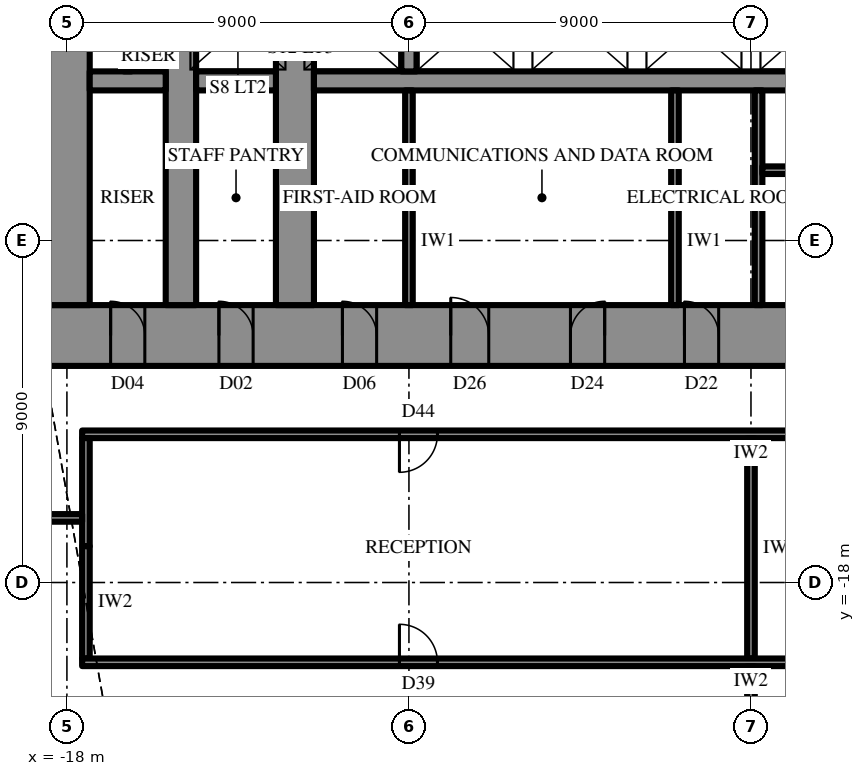
"""IFC4 building model, lengths in metres.
Left out: names, types, materials, properties, quantities, classifications, styles, units other than length and angle.
Written with IfcOpenShell. Run it as: python <this file> out.ifc"""

import sys

from ifc_helpers import new_model, si_unit, direction, frame, frame_2d, origin, place, context, subcontext, project, spatial, rectangle, extrude, element, fill, save


model = new_model("IFC4")
c1 = context("Model", 3, precision=1e-05, world=origin(), true_north=direction((0.0, 1.0)))
c2 = subcontext(c1, "Body", "Model", "MODEL_VIEW")
j1 = project(units=[si_unit("LENGTHUNIT", "METRE"), si_unit("PLANEANGLEUNIT", "RADIAN")], contexts=[c1])
p1 = place(None, origin())
s1 = spatial("IfcSite", under=j1, at=p1, CompositionType="ELEMENT")
p2 = place(p1, origin())
s2 = spatial("IfcBuilding", under=s1, at=p2, CompositionType="ELEMENT")
p3 = place(p2, frame((0.0, 0.0, 210.5)))
s3 = spatial("IfcBuildingStorey", under=s2, at=p3, CompositionType="ELEMENT", Elevation=210.5)
p4 = place(p3, frame((18.6, -11.5, 0.0), z_axis=(0.0, 0.0, 1.0), x_axis=(-1.0, 0.0, 0.0)))
e1 = element("IfcWall", 1, at=p4, inside=s3, PredefinedType="SHEAR", context=c2, shape_type="SweptSolid", body=[
    extrude(rectangle(XDim=37.2, YDim=1.6, at=frame_2d((18.6, 0.0))), origin(), (0.0, 0.0, 1.0), 5.0),
])
p5 = place(p4, frame((19.45, 0.0, 0.0)))
e2 = element("IfcOpeningElement", 2, at=p5, cuts=e1, PredefinedType="OPENING", context=c2, shape_type="SweptSolid", body=[
    extrude(rectangle(XDim=0.9, YDim=2.2, at=frame_2d((0.45, 1.1))), frame((0.0, 0.81, 0.0), z_axis=(0.0, -1.0, 0.0), x_axis=(1.0, 0.0, 0.0)), (0.0, 0.0, 1.0), 1.62),
])
p6 = place(p4, frame((22.45, 0.0, 0.0)))
e3 = element("IfcOpeningElement", 3, at=p6, cuts=e1, PredefinedType="OPENING", context=c2, shape_type="SweptSolid", body=[
    extrude(rectangle(XDim=0.9, YDim=2.2, at=frame_2d((0.45, 1.1))), frame((0.0, 0.81, 0.0), z_axis=(0.0, -1.0, 0.0), x_axis=(1.0, 0.0, 0.0)), (0.0, 0.0, 1.0), 1.62),
])
p7 = place(p4, frame((25.5, 0.0, 0.0)))
e4 = element("IfcOpeningElement", 4, at=p7, cuts=e1, PredefinedType="OPENING", context=c2, shape_type="SweptSolid", body=[
    extrude(rectangle(XDim=1.0, YDim=2.2, at=frame_2d((0.5, 1.1))), frame((0.0, 0.81, 0.0), z_axis=(0.0, -1.0, 0.0), x_axis=(1.0, 0.0, 0.0)), (0.0, 0.0, 1.0), 1.62),
])
p8 = place(p4, frame((1.75, 0.0, 0.0)))
e5 = element("IfcOpeningElement", 5, at=p8, cuts=e1, PredefinedType="OPENING", context=c2, shape_type="SweptSolid", body=[
    extrude(rectangle(XDim=0.9, YDim=2.2, at=frame_2d((0.45, 1.1))), frame((0.0, 0.81, 0.0), z_axis=(0.0, -1.0, 0.0), x_axis=(1.0, 0.0, 0.0)), (0.0, 0.0, 1.0), 1.62),
])
p9 = place(p4, frame((4.6, 0.0, 0.0)))
e6 = element("IfcOpeningElement", 6, at=p9, cuts=e1, PredefinedType="OPENING", context=c2, shape_type="SweptSolid", body=[
    extrude(rectangle(XDim=0.9, YDim=2.2, at=frame_2d((0.45, 1.1))), frame((0.0, 0.81, 0.0), z_axis=(0.0, -1.0, 0.0), x_axis=(1.0, 0.0, 0.0)), (0.0, 0.0, 1.0), 1.62),
])
p10 = place(p4, frame((7.85, 0.0, 0.0)))
e7 = element("IfcOpeningElement", 7, at=p10, cuts=e1, PredefinedType="OPENING", context=c2, shape_type="SweptSolid", body=[
    extrude(rectangle(XDim=0.9, YDim=2.2, at=frame_2d((0.45, 1.1))), frame((0.0, 0.81, 0.0), z_axis=(0.0, -1.0, 0.0), x_axis=(1.0, 0.0, 0.0)), (0.0, 0.0, 1.0), 1.62),
])
p11 = place(p4, frame((28.45, 0.0, 0.0)))
e8 = element("IfcOpeningElement", 8, at=p11, cuts=e1, PredefinedType="OPENING", context=c2, shape_type="SweptSolid", body=[
    extrude(rectangle(XDim=0.9, YDim=2.2, at=frame_2d((0.45, 1.1))), frame((0.0, 0.81, 0.0), z_axis=(0.0, -1.0, 0.0), x_axis=(1.0, 0.0, 0.0)), (0.0, 0.0, 1.0), 1.62),
])
p12 = place(p4, frame((31.7, 0.0, 0.0)))
e9 = element("IfcOpeningElement", 9, at=p12, cuts=e1, PredefinedType="OPENING", context=c2, shape_type="SweptSolid", body=[
    extrude(rectangle(XDim=0.9, YDim=2.2, at=frame_2d((0.45, 1.1))), frame((0.0, 0.81, 0.0), z_axis=(0.0, -1.0, 0.0), x_axis=(1.0, 0.0, 0.0)), (0.0, 0.0, 1.0), 1.62),
])
p13 = place(p4, frame((34.55, 0.0, 0.0)))
e10 = element("IfcOpeningElement", 10, at=p13, cuts=e1, PredefinedType="OPENING", context=c2, shape_type="SweptSolid", body=[
    extrude(rectangle(XDim=0.9, YDim=2.2, at=frame_2d((0.45, 1.1))), frame((0.0, 0.81, 0.0), z_axis=(0.0, -1.0, 0.0), x_axis=(1.0, 0.0, 0.0)), (0.0, 0.0, 1.0), 1.62),
])
p14 = place(p3, frame((-18.0, 10.7, 0.0), z_axis=(0.0, 0.0, 1.0), x_axis=(0.0, -1.0, 0.0)))
e11 = element("IfcWall", 11, at=p14, inside=s3, PredefinedType="SHEAR", context=c2, shape_type="SweptSolid", body=[
    extrude(rectangle(XDim=21.4, YDim=1.2, at=frame_2d((10.7, 0.0))), origin(), (0.0, 0.0, 1.0), 5.0),
])
p15 = place(p14, frame((9.8, 0.0, 0.0)))
e12 = element("IfcOpeningElement", 12, at=p15, cuts=e11, PredefinedType="OPENING", context=c2, shape_type="SweptSolid", body=[
    extrude(rectangle(XDim=1.8, YDim=2.4, at=frame_2d((0.9, 1.2))), frame((0.0, 0.61, 0.0), z_axis=(0.0, -1.0, 0.0), x_axis=(1.0, 0.0, 0.0)), (0.0, 0.0, 1.0), 1.22),
])
p16 = place(p3, frame((-12.0, -10.7, 0.0), z_axis=(0.0, 0.0, 1.0), x_axis=(0.0, 1.0, 0.0)))
e13 = element("IfcWall", 13, at=p16, inside=s3, PredefinedType="SHEAR", context=c2, shape_type="SweptSolid", body=[
    extrude(rectangle(XDim=21.4, YDim=1.0, at=frame_2d((10.7, 0.0))), origin(), (0.0, 0.0, 1.0), 5.0),
])
p17 = place(p16, frame((9.8, 0.0, 0.0)))
e14 = element("IfcOpeningElement", 14, at=p17, cuts=e13, PredefinedType="OPENING", context=c2, shape_type="SweptSolid", body=[
    extrude(rectangle(XDim=1.8, YDim=2.4, at=frame_2d((0.9, 1.2))), frame((0.0, 0.51, 0.0), z_axis=(0.0, -1.0, 0.0), x_axis=(1.0, 0.0, 0.0)), (0.0, 0.0, 1.0), 1.02),
])
p18 = place(p3, frame((-15.0, -10.7, 0.0), z_axis=(0.0, 0.0, 1.0), x_axis=(0.0, 1.0, 0.0)))
e15 = element("IfcWall", 15, at=p18, inside=s3, PredefinedType="SHEAR", context=c2, shape_type="SweptSolid", body=[
    extrude(rectangle(XDim=21.4, YDim=0.8, at=frame_2d((10.7, 0.0))), origin(), (0.0, 0.0, 1.0), 5.0),
])
p19 = place(p18, frame((9.8, 0.0, 0.0)))
e16 = element("IfcOpeningElement", 16, at=p19, cuts=e15, PredefinedType="OPENING", context=c2, shape_type="SweptSolid", body=[
    extrude(rectangle(XDim=1.8, YDim=2.4, at=frame_2d((0.9, 1.2))), frame((0.0, 0.41, 0.0), z_axis=(0.0, -1.0, 0.0), x_axis=(1.0, 0.0, 0.0)), (0.0, 0.0, 1.0), 0.82),
])
p20 = place(p3, frame((11.5, -4.8, 0.0), z_axis=(0.0, 0.0, 1.0), x_axis=(-1.0, 0.0, 0.0)))
e17 = element("IfcWall", 17, at=p20, inside=s3, PredefinedType="SHEAR", context=c2, shape_type="SweptSolid", body=[
    extrude(rectangle(XDim=23.0, YDim=0.5, at=frame_2d((11.5, 0.0))), origin(), (0.0, 0.0, 1.0), 5.0),
])
p21 = place(p20, frame((6.4, 0.0, 0.0)))
e18 = element("IfcOpeningElement", 18, at=p21, cuts=e17, PredefinedType="OPENING", context=c2, shape_type="SweptSolid", body=[
    extrude(rectangle(XDim=1.2, YDim=2.2, at=frame_2d((0.6, 1.1))), frame((0.0, 0.26, 0.0), z_axis=(0.0, -1.0, 0.0), x_axis=(1.0, 0.0, 0.0)), (0.0, 0.0, 1.0), 0.52),
])
p22 = place(p20, frame((3.4, 0.0, 0.0)))
e19 = element("IfcOpeningElement", 19, at=p22, cuts=e17, PredefinedType="OPENING", context=c2, shape_type="SweptSolid", body=[
    extrude(rectangle(XDim=1.2, YDim=2.2, at=frame_2d((0.6, 1.1))), frame((0.0, 0.26, 0.0), z_axis=(0.0, -1.0, 0.0), x_axis=(1.0, 0.0, 0.0)), (0.0, 0.0, 1.0), 0.52),
])
p23 = place(p3, frame((-12.5, -4.8, 0.0), z_axis=(0.0, 0.0, 1.0), x_axis=(-1.0, 0.0, 0.0)))
e20 = element("IfcWall", 20, at=p23, inside=s3, PredefinedType="SHEAR", context=c2, shape_type="SweptSolid", body=[
    extrude(rectangle(XDim=2.1, YDim=0.5, at=frame_2d((1.05, 0.0))), origin(), (0.0, 0.0, 1.0), 5.0),
])
p24 = place(p3, frame((-15.4, -4.8, 0.0), z_axis=(0.0, 0.0, 1.0), x_axis=(-1.0, 0.0, 0.0)))
e21 = element("IfcWall", 21, at=p24, inside=s3, PredefinedType="SHEAR", context=c2, shape_type="SweptSolid", body=[
    extrude(rectangle(XDim=2.0, YDim=0.5, at=frame_2d((1.0, 0.0))), origin(), (0.0, 0.0, 1.0), 5.0),
])
p25 = place(p3, frame((-9.0, -2.25, 0.0), z_axis=(0.0, 0.0, 1.0), x_axis=(0.0, -1.0, 0.0)))
e22 = element("IfcWall", 22, at=p25, inside=s3, PredefinedType="SHEAR", context=c2, shape_type="SweptSolid", body=[
    extrude(rectangle(XDim=2.3, YDim=0.4, at=frame_2d((1.15, 0.0))), origin(), (0.0, 0.0, 1.0), 5.0),
])
p26 = place(p3, frame((0.2, -5.05, 0.0), z_axis=(0.0, 0.0, 1.0), x_axis=(0.0, -1.0, 0.0)))
e23 = element("IfcWall", 23, at=p26, inside=s3, PredefinedType="SHEAR", context=c2, shape_type="SweptSolid", body=[
    extrude(rectangle(XDim=5.65, YDim=0.2, at=frame_2d((2.825, 0.0))), origin(), (0.0, 0.0, 1.0), 5.0),
])
p27 = place(p3, frame((8.9, -7.15, 0.0), z_axis=(0.0, 0.0, 1.0), x_axis=(-1.0, 0.0, 0.0)))
e24 = element("IfcWall", 24, at=p27, inside=s3, PredefinedType="SHEAR", context=c2, shape_type="SweptSolid", body=[
    extrude(rectangle(XDim=8.6, YDim=0.2, at=frame_2d((4.3, 0.0))), origin(), (0.0, 0.0, 1.0), 5.0),
])
p28 = place(p27, frame((0.3, 0.0, 0.0)))
e25 = element("IfcOpeningElement", 25, at=p28, cuts=e24, PredefinedType="OPENING", context=c2, shape_type="SweptSolid", body=[
    extrude(rectangle(XDim=1.0, YDim=2.2, at=frame_2d((0.5, 1.1))), frame((0.0, 0.11, 0.0), z_axis=(0.0, -1.0, 0.0), x_axis=(1.0, 0.0, 0.0)), (0.0, 0.0, 1.0), 0.22),
])
p29 = place(p3, frame((-31.913, -2.425, 0.0), z_axis=(0.0, 0.0, 1.0), x_axis=(0.500001051461, -0.866024796723, 0.0)))
e26 = element("IfcWall", 26, at=p29, inside=s3, PredefinedType="SOLIDWALL", context=c2, shape_type="SweptSolid", body=[
    extrude(rectangle(XDim=27.713, YDim=0.3, at=frame_2d((13.856, 0.0))), origin(), (0.0, 0.0, 1.0), 2.8),
])
p30 = place(p29, frame((1.309, 0.0, 0.6)))
e27 = element("IfcOpeningElement", 27, at=p30, cuts=e26, PredefinedType="OPENING", context=c2, shape_type="SweptSolid", body=[
    extrude(rectangle(XDim=2.0, YDim=1.95, at=frame_2d((1.0, 0.975))), frame((0.0, 0.16, 0.0), z_axis=(0.0, -1.0, 0.0), x_axis=(1.0, 0.0, 0.0)), (0.0, 0.0, 1.0), 0.32),
])
p31 = place(p29, frame((5.928, 0.0, 0.6)))
e28 = element("IfcOpeningElement", 28, at=p31, cuts=e26, PredefinedType="OPENING", context=c2, shape_type="SweptSolid", body=[
    extrude(rectangle(XDim=2.0, YDim=1.95, at=frame_2d((1.0, 0.975))), frame((0.0, 0.16, 0.0), z_axis=(0.0, -1.0, 0.0), x_axis=(1.0, 0.0, 0.0)), (0.0, 0.0, 1.0), 0.32),
])
p32 = place(p29, frame((10.947, 0.0, 0.0)))
e29 = element("IfcOpeningElement", 29, at=p32, cuts=e26, PredefinedType="OPENING", context=c2, shape_type="SweptSolid", body=[
    extrude(rectangle(XDim=1.2, YDim=2.4, at=frame_2d((0.6, 1.2))), frame((0.0, 0.16, 0.0), z_axis=(0.0, -1.0, 0.0), x_axis=(1.0, 0.0, 0.0)), (0.0, 0.0, 1.0), 0.32),
])
p33 = place(p29, frame((15.166, 0.0, 0.6)))
e30 = element("IfcOpeningElement", 30, at=p33, cuts=e26, PredefinedType="OPENING", context=c2, shape_type="SweptSolid", body=[
    extrude(rectangle(XDim=2.0, YDim=1.95, at=frame_2d((1.0, 0.975))), frame((0.0, 0.16, 0.0), z_axis=(0.0, -1.0, 0.0), x_axis=(1.0, 0.0, 0.0)), (0.0, 0.0, 1.0), 0.32),
])
p34 = place(p29, frame((19.785, 0.0, 0.6)))
e31 = element("IfcOpeningElement", 31, at=p34, cuts=e26, PredefinedType="OPENING", context=c2, shape_type="SweptSolid", body=[
    extrude(rectangle(XDim=2.0, YDim=1.95, at=frame_2d((1.0, 0.975))), frame((0.0, 0.16, 0.0), z_axis=(0.0, -1.0, 0.0), x_axis=(1.0, 0.0, 0.0)), (0.0, 0.0, 1.0), 0.32),
])
p35 = place(p29, frame((24.403, 0.0, 0.6)))
e32 = element("IfcOpeningElement", 32, at=p35, cuts=e26, PredefinedType="OPENING", context=c2, shape_type="SweptSolid", body=[
    extrude(rectangle(XDim=2.0, YDim=1.95, at=frame_2d((1.0, 0.975))), frame((0.0, 0.16, 0.0), z_axis=(0.0, -1.0, 0.0), x_axis=(1.0, 0.0, 0.0)), (0.0, 0.0, 1.0), 0.32),
])
for number, where, z_axis, x_axis in (
    (33, (-9.0, -5.05, 0.0), (0.0, 0.0, 1.0), (0.0, -1.0, 0.0)),
    (34, (-2.0, -5.05, 0.0), (0.0, 0.0, 1.0), (0.0, -1.0, 0.0)),
):
    element("IfcWall", number, at=place(p3, frame(where, z_axis=z_axis, x_axis=x_axis)), inside=s3, PredefinedType="PARTITIONING", context=c2, shape_type="SweptSolid", body=[
        extrude(rectangle(XDim=5.65, YDim=0.2, at=frame_2d((2.825, 0.0))), origin(), (0.0, 0.0, 1.0), 4.8),
    ])
p36 = place(p3, frame((-16.4, -3.55, 0.0), z_axis=(0.0, 0.0, 1.0), x_axis=(0.0, -1.0, 0.0)))
e35 = element("IfcWall", 35, at=p36, inside=s3, PredefinedType="PARTITIONING", context=c2, shape_type="SweptSolid", body=[
    extrude(rectangle(XDim=1.0, YDim=0.2, at=frame_2d((0.5, 0.0))), origin(), (0.0, 0.0, 1.0), 4.8),
])
p37 = place(p3, frame((17.6, -14.1, 0.0), z_axis=(0.0, 0.0, 1.0), x_axis=(-1.0, 0.0, 0.0)))
e36 = element("IfcWall", 36, at=p37, inside=s3, PredefinedType="PARTITIONING", context=c2, shape_type="SweptSolid", body=[
    extrude(rectangle(XDim=35.2, YDim=0.2, at=frame_2d((17.6, 0.0))), origin(), (0.0, 0.0, 1.0), 4.8),
])
p38 = place(p37, frame((7.95, 0.0, 0.0)))
e37 = element("IfcOpeningElement", 37, at=p38, cuts=e36, PredefinedType="OPENING", context=c2, shape_type="SweptSolid", body=[
    extrude(rectangle(XDim=1.8, YDim=2.4, at=frame_2d((0.9, 1.2))), frame((0.0, 0.11, 0.0), z_axis=(0.0, -1.0, 0.0), x_axis=(1.0, 0.0, 0.0)), (0.0, 0.0, 1.0), 0.22),
])
p39 = place(p37, frame((25.85, 0.0, 0.0)))
e38 = element("IfcOpeningElement", 38, at=p39, cuts=e36, PredefinedType="OPENING", context=c2, shape_type="SweptSolid", body=[
    extrude(rectangle(XDim=1.0, YDim=2.2, at=frame_2d((0.5, 1.1))), frame((0.0, 0.11, 0.0), z_axis=(0.0, -1.0, 0.0), x_axis=(1.0, 0.0, 0.0)), (0.0, 0.0, 1.0), 0.22),
])
p40 = place(p3, frame((0.0, -14.2, 0.0), z_axis=(0.0, 0.0, 1.0), x_axis=(0.0, -1.0, 0.0)))
e39 = element("IfcWall", 39, at=p40, inside=s3, PredefinedType="PARTITIONING", context=c2, shape_type="SweptSolid", body=[
    extrude(rectangle(XDim=5.8, YDim=0.2, at=frame_2d((2.9, 0.0))), origin(), (0.0, 0.0, 1.0), 3.792),
])
p41 = place(p3, frame((-17.5, -14.2, 0.0), z_axis=(0.0, 0.0, 1.0), x_axis=(0.0, -1.0, 0.0)))
e40 = element("IfcWall", 40, at=p41, inside=s3, PredefinedType="PARTITIONING", context=c2, shape_type="SweptSolid", body=[
    extrude(rectangle(XDim=2.844, YDim=0.2, at=frame_2d((1.422, 0.0))), origin(), (0.0, 0.0, 1.0), 4.8),
])
p42 = place(p3, frame((-17.5, -17.044, 0.0), z_axis=(0.0, 0.0, 1.0), x_axis=(0.0, -1.0, 0.0)))
e41 = element("IfcWall", 41, at=p42, inside=s3, PredefinedType="PARTITIONING", context=c2, shape_type="SweptSolid", body=[
    extrude(rectangle(XDim=2.956, YDim=0.2, at=frame_2d((1.478, 0.0))), origin(), (0.0, 0.0, 1.0), 3.744),
])
p43 = place(p3, frame((17.6, -20.1, 0.0), z_axis=(0.0, 0.0, 1.0), x_axis=(-1.0, 0.0, 0.0)))
e42 = element("IfcWall", 42, at=p43, inside=s3, PredefinedType="PARTITIONING", context=c2, shape_type="SweptSolid", body=[
    extrude(rectangle(XDim=35.2, YDim=0.2, at=frame_2d((17.6, 0.0))), origin(), (0.0, 0.0, 1.0), 4.8),
])
p44 = place(p43, frame((3.575, 0.0, 0.0)))
e43 = element("IfcOpeningElement", 43, at=p44, cuts=e42, PredefinedType="OPENING", context=c2, shape_type="SweptSolid", body=[
    extrude(rectangle(XDim=1.8, YDim=2.4, at=frame_2d((0.9, 1.2))), frame((0.0, 0.11, 0.0), z_axis=(0.0, -1.0, 0.0), x_axis=(1.0, 0.0, 0.0)), (0.0, 0.0, 1.0), 0.22),
])
p45 = place(p43, frame((12.325, 0.0, 0.0)))
e44 = element("IfcOpeningElement", 44, at=p45, cuts=e42, PredefinedType="OPENING", context=c2, shape_type="SweptSolid", body=[
    extrude(rectangle(XDim=1.8, YDim=2.4, at=frame_2d((0.9, 1.2))), frame((0.0, 0.11, 0.0), z_axis=(0.0, -1.0, 0.0), x_axis=(1.0, 0.0, 0.0)), (0.0, 0.0, 1.0), 0.22),
])
p46 = place(p43, frame((25.85, 0.0, 0.0)))
e45 = element("IfcOpeningElement", 45, at=p46, cuts=e42, PredefinedType="OPENING", context=c2, shape_type="SweptSolid", body=[
    extrude(rectangle(XDim=1.0, YDim=2.2, at=frame_2d((0.5, 1.1))), frame((0.0, 0.11, 0.0), z_axis=(0.0, -1.0, 0.0), x_axis=(1.0, 0.0, 0.0)), (0.0, 0.0, 1.0), 0.22),
])
p47 = place(p3, frame((-17.6, -16.3, 0.0), z_axis=(0.0, 0.0, 1.0), x_axis=(-1.0, 0.0, 0.0)))
e46 = element("IfcWall", 46, at=p47, inside=s3, PredefinedType="PARTITIONING", context=c2, shape_type="SweptSolid", body=[
    extrude(rectangle(XDim=4.9, YDim=0.2, at=frame_2d((2.45, 0.0))), origin(), (0.0, 0.0, 1.0), 4.8),
])
p48 = place(p3, frame((0.0, -20.2, 0.0), z_axis=(0.0, 0.0, 1.0), x_axis=(0.0, -1.0, 0.0)))
e47 = element("IfcWall", 47, at=p48, inside=s3, PredefinedType="PARTITIONING", context=c2, shape_type="SweptSolid", body=[
    extrude(rectangle(XDim=8.61, YDim=0.2, at=frame_2d((4.305, 0.0))), origin(), (0.0, 0.0, 1.0), 3.792),
])
p49 = place(p5, frame((0.9, 0.0, 0.0), z_axis=(0.0, 0.0, 1.0), x_axis=(-1.0, 0.0, 0.0)))
e48 = element("IfcDoor", 48, at=p49, inside=s3, OperationType="SINGLE_SWING_RIGHT", PredefinedType="DOOR", context=c2, shape_type="SweptSolid", body=[
    extrude(rectangle(XDim=0.9, YDim=2.2, at=frame_2d((0.45, 1.1))), frame((0.0, 0.025, 0.0), z_axis=(0.0, -1.0, 0.0), x_axis=(1.0, 0.0, 0.0)), (0.0, 0.0, 1.0), 0.05),
])
fill(e2, e48)
p50 = place(p6, frame((0.9, 0.0, 0.0), z_axis=(0.0, 0.0, 1.0), x_axis=(-1.0, 0.0, 0.0)))
e49 = element("IfcDoor", 49, at=p50, inside=s3, OperationType="SINGLE_SWING_LEFT", PredefinedType="DOOR", context=c2, shape_type="SweptSolid", body=[
    extrude(rectangle(XDim=0.9, YDim=2.2, at=frame_2d((0.45, 1.1))), frame((0.0, 0.025, 0.0), z_axis=(0.0, -1.0, 0.0), x_axis=(1.0, 0.0, 0.0)), (0.0, 0.0, 1.0), 0.05),
])
fill(e3, e49)
p51 = place(p7, frame((1.0, 0.0, 0.0), z_axis=(0.0, 0.0, 1.0), x_axis=(-1.0, 0.0, 0.0)))
e50 = element("IfcDoor", 50, at=p51, inside=s3, OperationType="SINGLE_SWING_RIGHT", PredefinedType="DOOR", context=c2, shape_type="SweptSolid", body=[
    extrude(rectangle(XDim=1.0, YDim=2.2, at=frame_2d((0.5, 1.1))), frame((0.0, 0.025, 0.0), z_axis=(0.0, -1.0, 0.0), x_axis=(1.0, 0.0, 0.0)), (0.0, 0.0, 1.0), 0.05),
])
fill(e4, e50)
p52 = place(p11, frame((0.9, 0.0, 0.0), z_axis=(0.0, 0.0, 1.0), x_axis=(-1.0, 0.0, 0.0)))
e51 = element("IfcDoor", 51, at=p52, inside=s3, OperationType="SINGLE_SWING_RIGHT", PredefinedType="DOOR", context=c2, shape_type="SweptSolid", body=[
    extrude(rectangle(XDim=0.9, YDim=2.2, at=frame_2d((0.45, 1.1))), frame((0.0, 0.025, 0.0), z_axis=(0.0, -1.0, 0.0), x_axis=(1.0, 0.0, 0.0)), (0.0, 0.0, 1.0), 0.05),
])
fill(e8, e51)
p53 = place(p12, frame((0.9, 0.0, 0.0), z_axis=(0.0, 0.0, 1.0), x_axis=(-1.0, 0.0, 0.0)))
e52 = element("IfcDoor", 52, at=p53, inside=s3, OperationType="SINGLE_SWING_RIGHT", PredefinedType="DOOR", context=c2, shape_type="SweptSolid", body=[
    extrude(rectangle(XDim=0.9, YDim=2.2, at=frame_2d((0.45, 1.1))), frame((0.0, 0.025, 0.0), z_axis=(0.0, -1.0, 0.0), x_axis=(1.0, 0.0, 0.0)), (0.0, 0.0, 1.0), 0.05),
])
fill(e9, e52)
p54 = place(p13, frame((0.9, 0.0, 0.0), z_axis=(0.0, 0.0, 1.0), x_axis=(-1.0, 0.0, 0.0)))
e53 = element("IfcDoor", 53, at=p54, inside=s3, OperationType="SINGLE_SWING_RIGHT", PredefinedType="DOOR", context=c2, shape_type="SweptSolid", body=[
    extrude(rectangle(XDim=0.9, YDim=2.2, at=frame_2d((0.45, 1.1))), frame((0.0, 0.025, 0.0), z_axis=(0.0, -1.0, 0.0), x_axis=(1.0, 0.0, 0.0)), (0.0, 0.0, 1.0), 0.05),
])
fill(e10, e53)
p55 = place(p46, frame((1.0, 0.0, 0.0), z_axis=(0.0, 0.0, 1.0), x_axis=(-1.0, 0.0, 0.0)))
e54 = element("IfcDoor", 54, at=p55, inside=s3, OperationType="SINGLE_SWING_RIGHT", PredefinedType="DOOR", context=c2, shape_type="SweptSolid", body=[
    extrude(rectangle(XDim=1.0, YDim=2.2, at=frame_2d((0.5, 1.1))), frame((0.0, 0.025, 0.0), z_axis=(0.0, -1.0, 0.0), x_axis=(1.0, 0.0, 0.0)), (0.0, 0.0, 1.0), 0.05),
])
fill(e45, e54)
p56 = place(p39, origin())
e55 = element("IfcDoor", 55, at=p56, inside=s3, OperationType="SINGLE_SWING_LEFT", PredefinedType="DOOR", context=c2, shape_type="SweptSolid", body=[
    extrude(rectangle(XDim=1.0, YDim=2.2, at=frame_2d((0.5, 1.1))), frame((0.0, 0.025, 0.0), z_axis=(0.0, -1.0, 0.0), x_axis=(1.0, 0.0, 0.0)), (0.0, 0.0, 1.0), 0.05),
])
fill(e38, e55)
save(model, sys.argv[1])
